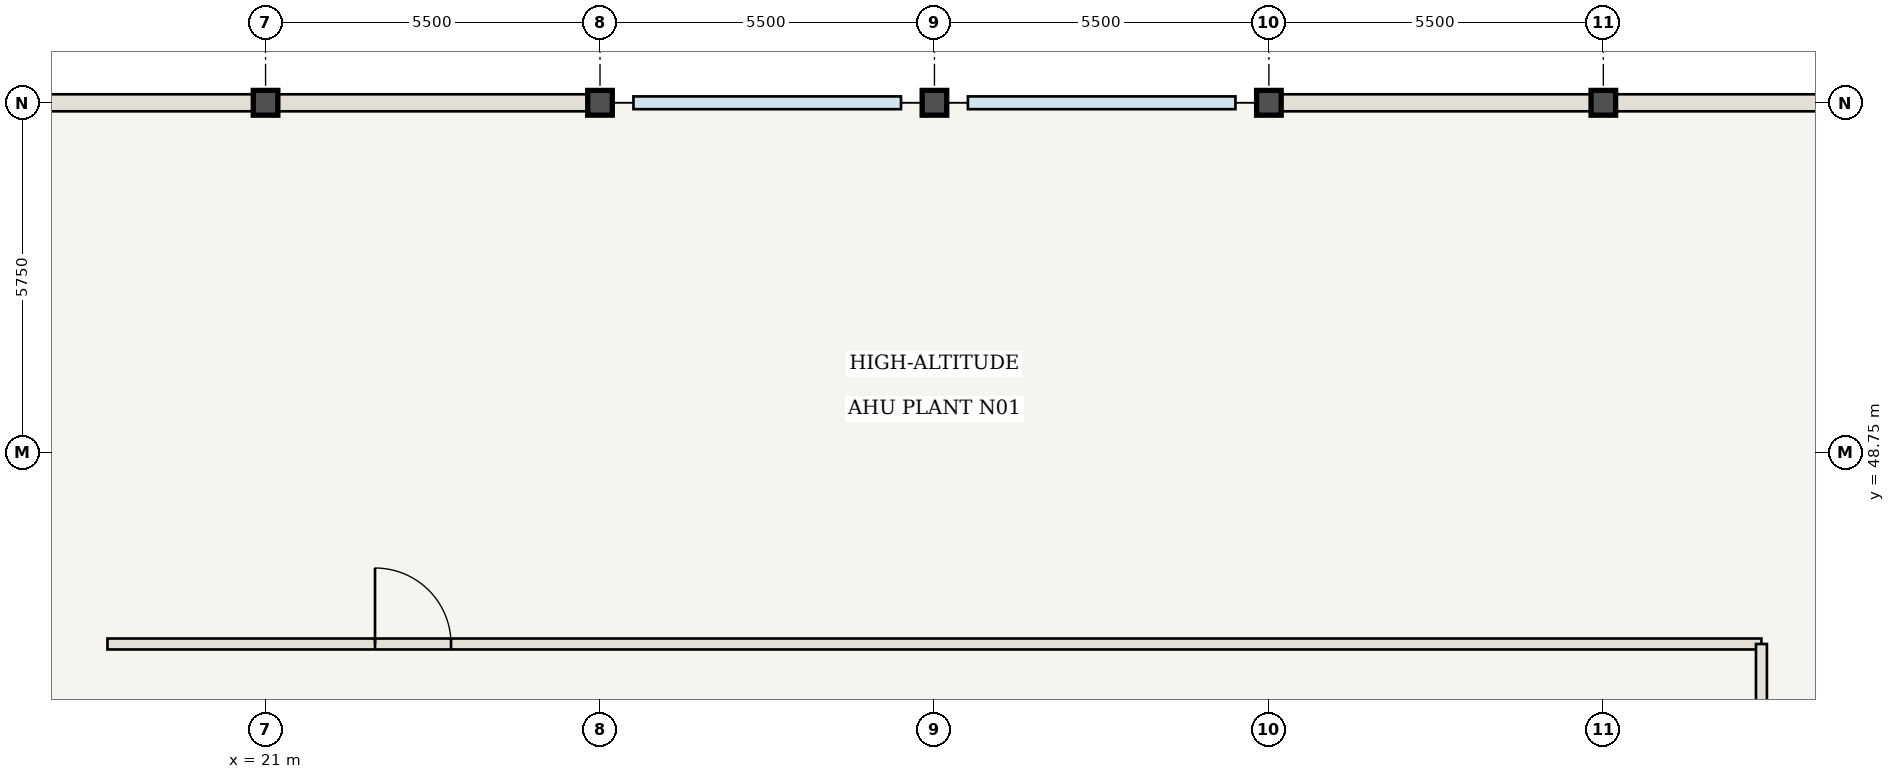
"""IFC4 building model, lengths in metres.
Left out: names, types, materials, properties, quantities, classifications, styles, units other than length and angle.
Written with IfcOpenShell. Run it as: python <this file> out.ifc"""

import sys

from ifc_helpers import new_model, si_unit, direction, frame, frame_2d, origin, origin_2d, place, context, subcontext, project, spatial, rectangle, i_section, extrude, element, fill, save


model = new_model("IFC4")
c1 = context("Model", 3, precision=1e-05, world=origin(), true_north=direction((0.0, 1.0)))
c2 = subcontext(c1, "Body", "Model", "MODEL_VIEW")
j1 = project(units=[si_unit("LENGTHUNIT", "METRE"), si_unit("PLANEANGLEUNIT", "RADIAN")], contexts=[c1])
p1 = place(None, origin())
s1 = spatial("IfcSite", under=j1, at=p1, CompositionType="ELEMENT")
p2 = place(p1, origin())
s2 = spatial("IfcBuilding", under=s1, at=p2, CompositionType="ELEMENT")
p3 = place(p2, frame((0.0, 0.0, 313.25)))
s3 = spatial("IfcBuildingStorey", under=s2, at=p3, CompositionType="ELEMENT", Elevation=313.25)
for number, where, z_axis, x_axis in (
    (1, (21.0, 54.5, 0.0), (0.0, 0.0, 1.0), (1.0, 0.0, 0.0)),
    (2, (26.5, 54.5, 0.0), (0.0, 0.0, 1.0), (1.0, 0.0, 0.0)),
    (3, (32.0, 54.5, 0.0), (0.0, 0.0, 1.0), (1.0, 0.0, 0.0)),
    (4, (37.5, 54.5, 0.0), (0.0, 0.0, 1.0), (1.0, 0.0, 0.0)),
    (5, (43.0, 54.5, 0.0), (0.0, 0.0, 1.0), (1.0, 0.0, 0.0)),
):
    element("IfcColumn", number, at=place(p3, frame(where, z_axis=z_axis, x_axis=x_axis)), inside=s3, PredefinedType="COLUMN", context=c2, shape_type="SweptSolid", body=[
        extrude(i_section(OverallWidth=0.404, OverallDepth=0.407, WebThickness=0.027, FlangeThickness=0.044, at=origin_2d()), origin(), (0.0, 0.0, 1.0), 4.55),
    ])
p4 = place(p3, frame((18.4, 45.6, 0.0), z_axis=(0.0, 0.0, 1.0), x_axis=(1.0, 0.0, 0.0)))
e6 = element("IfcWall", 6, at=p4, inside=s3, PredefinedType="STANDARD", context=c2, shape_type="SweptSolid", body=[
    extrude(rectangle(XDim=27.2, YDim=0.18, at=frame_2d((13.6, 0.0))), origin(), (0.0, 0.0, 1.0), 4.29),
])
p5 = place(p4, frame((4.4, 0.0, 0.0)))
e7 = element("IfcOpeningElement", 7, at=p5, cuts=e6, PredefinedType="OPENING", context=c2, shape_type="SweptSolid", body=[
    extrude(rectangle(XDim=1.25, YDim=2.2, at=frame_2d((0.625, 1.1))), frame((0.0, 0.1, 0.0), z_axis=(0.0, -1.0, 0.0), x_axis=(1.0, 0.0, 0.0)), (0.0, 0.0, 1.0), 0.2),
])
p6 = place(p3, frame((45.6, 18.4, 0.0), z_axis=(0.0, 0.0, 1.0), x_axis=(0.0, 1.0, 0.0)))
e8 = element("IfcWall", 8, at=p6, inside=s3, PredefinedType="STANDARD", context=c2, shape_type="SweptSolid", body=[
    extrude(rectangle(XDim=27.2, YDim=0.18, at=frame_2d((13.6, 0.0))), origin(), (0.0, 0.0, 1.0), 4.29),
])
p7 = place(p6, frame((14.55, 0.0, 0.0)))
e9 = element("IfcOpeningElement", 9, at=p7, cuts=e8, PredefinedType="OPENING", context=c2, shape_type="SweptSolid", body=[
    extrude(rectangle(XDim=1.25, YDim=2.2, at=frame_2d((0.625, 1.1))), frame((0.0, 0.1, 0.0), z_axis=(0.0, -1.0, 0.0), x_axis=(1.0, 0.0, 0.0)), (0.0, 0.0, 1.0), 0.2),
])
for number, where, z_axis, x_axis in (
    (10, (15.5, 54.5, 0.0), (0.0, 0.0, 1.0), (1.0, 0.0, 0.0)),
    (11, (21.0, 54.5, 0.0), (0.0, 0.0, 1.0), (1.0, 0.0, 0.0)),
    (12, (37.5, 54.5, 0.0), (0.0, 0.0, 1.0), (1.0, 0.0, 0.0)),
    (13, (43.0, 54.5, 0.0), (0.0, 0.0, 1.0), (1.0, 0.0, 0.0)),
):
    element("IfcWall", number, at=place(p3, frame(where, z_axis=z_axis, x_axis=x_axis)), inside=s3, PredefinedType="USERDEFINED", context=c2, shape_type="SweptSolid", body=[
        extrude(rectangle(XDim=5.5, YDim=0.28, at=frame_2d((2.75, 0.0))), origin(), (0.0, 0.0, 1.0), 3.57),
    ])
p8 = place(p5, origin())
e14 = element("IfcDoor", 14, at=p8, inside=s3, OperationType="SINGLE_SWING_LEFT", PredefinedType="DOOR", context=c2, shape_type="SweptSolid", body=[
    extrude(rectangle(XDim=1.25, YDim=2.2, at=frame_2d((0.625, 1.1))), frame((0.0, 0.025, 0.0), z_axis=(0.0, -1.0, 0.0), x_axis=(1.0, 0.0, 0.0)), (0.0, 0.0, 1.0), 0.05),
])
fill(e7, e14)
save(model, sys.argv[1])
